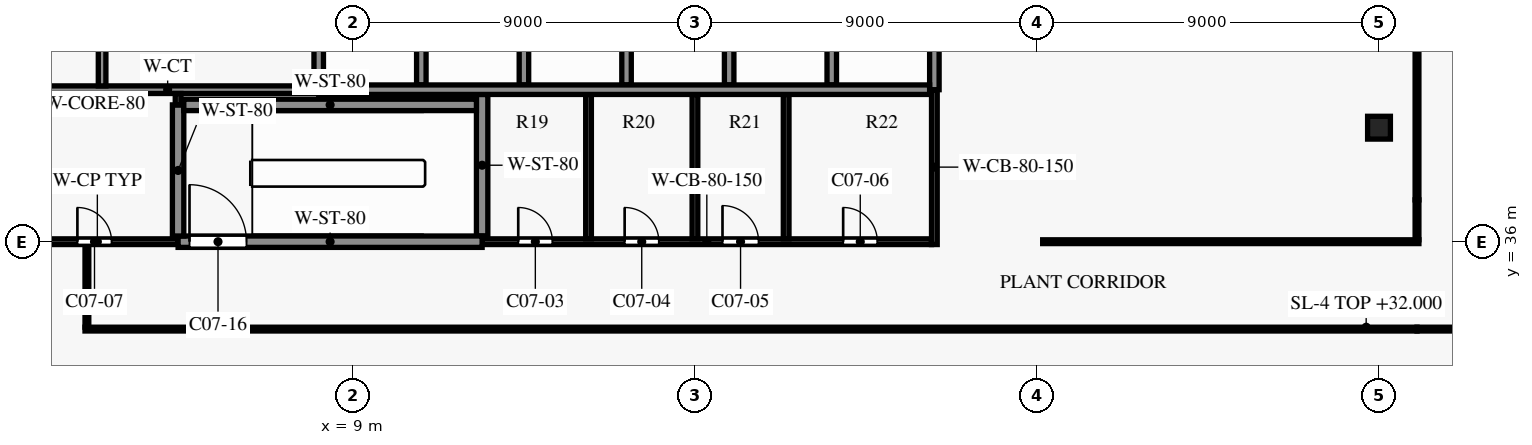
"""IFC4 building model, lengths in metres.
Left out: names, types, materials, properties, quantities, classifications, styles, units other than length and angle.
Written with IfcOpenShell. Run it as: python <this file> out.ifc"""

import sys

from ifc_helpers import new_model, si_unit, direction, frame, frame_2d, origin, origin_2d, place, context, subcontext, project, spatial, rectangle, hollow_rectangle, extrude, element, fill, save


model = new_model("IFC4")
c1 = context("Model", 3, precision=1e-05, world=origin(), true_north=direction((0.0, 1.0)))
c2 = subcontext(c1, "Body", "Model", "MODEL_VIEW")
j1 = project(units=[si_unit("LENGTHUNIT", "METRE"), si_unit("PLANEANGLEUNIT", "RADIAN")], contexts=[c1])
p1 = place(None, origin())
s1 = spatial("IfcSite", under=j1, at=p1, CompositionType="ELEMENT")
p2 = place(p1, origin())
s2 = spatial("IfcBuilding", under=s1, at=p2, CompositionType="ELEMENT")
p3 = place(p2, frame((0.0, 0.0, 32.0)))
s3 = spatial("IfcBuildingStorey", under=s2, at=p3, CompositionType="ELEMENT", Elevation=32.0)
p4 = place(p3, frame((36.0, 39.0, 0.0), z_axis=(0.0, 0.0, 1.0), x_axis=(1.0, 0.0, 0.0)))
e1 = element("IfcColumn", 1, at=p4, inside=s3, PredefinedType="COLUMN", context=c2, shape_type="SweptSolid", body=[
    extrude(hollow_rectangle(XDim=0.6, YDim=0.6, WallThickness=0.03, InnerFilletRadius=0.03, OuterFilletRadius=0.06, at=origin_2d()), origin(), (0.0, 0.0, 1.0), 5.5),
])
p5 = place(p3, frame((0.15, 36.0, 0.0), z_axis=(0.0, 0.0, 1.0), x_axis=(1.0, 0.0, 0.0)))
e2 = element("IfcWall", 2, at=p5, inside=s3, PredefinedType="PARTITIONING", context=c2, shape_type="SweptSolid", body=[
    extrude(rectangle(XDim=4.25, YDim=0.15, at=frame_2d((2.125, 0.0))), origin(), (0.0, 0.0, 1.0), 5.2),
])
p6 = place(p5, frame((1.6, 0.0, 0.0)))
e3 = element("IfcOpeningElement", 3, at=p6, cuts=e2, PredefinedType="OPENING", context=c2, shape_type="SweptSolid", body=[
    extrude(rectangle(XDim=0.9, YDim=2.1, at=frame_2d((0.45, 1.05))), frame((0.0, 0.085, 0.0), z_axis=(0.0, -1.0, 0.0), x_axis=(1.0, 0.0, 0.0)), (0.0, 0.0, 1.0), 0.17),
])
p7 = place(p3, frame((12.4, 36.0, 0.0), z_axis=(0.0, 0.0, 1.0), x_axis=(1.0, 0.0, 0.0)))
e4 = element("IfcWall", 4, at=p7, inside=s3, PredefinedType="SHEAR", context=c2, shape_type="SweptSolid", body=[
    extrude(rectangle(XDim=11.825, YDim=0.15, at=frame_2d((5.913, 0.0))), origin(), (0.0, 0.0, 1.0), 5.2),
])
p8 = place(p7, frame((0.95, 0.0, 0.0)))
e5 = element("IfcOpeningElement", 5, at=p8, cuts=e4, PredefinedType="OPENING", context=c2, shape_type="SweptSolid", body=[
    extrude(rectangle(XDim=0.9, YDim=2.1, at=frame_2d((0.45, 1.05))), frame((0.0, 0.085, 0.0), z_axis=(0.0, -1.0, 0.0), x_axis=(1.0, 0.0, 0.0)), (0.0, 0.0, 1.0), 0.17),
])
p9 = place(p7, frame((3.75, 0.0, 0.0)))
e6 = element("IfcOpeningElement", 6, at=p9, cuts=e4, PredefinedType="OPENING", context=c2, shape_type="SweptSolid", body=[
    extrude(rectangle(XDim=0.9, YDim=2.1, at=frame_2d((0.45, 1.05))), frame((0.0, 0.085, 0.0), z_axis=(0.0, -1.0, 0.0), x_axis=(1.0, 0.0, 0.0)), (0.0, 0.0, 1.0), 0.17),
])
p10 = place(p7, frame((6.325, 0.0, 0.0)))
e7 = element("IfcOpeningElement", 7, at=p10, cuts=e4, PredefinedType="OPENING", context=c2, shape_type="SweptSolid", body=[
    extrude(rectangle(XDim=0.95, YDim=2.1, at=frame_2d((0.475, 1.05))), frame((0.0, 0.085, 0.0), z_axis=(0.0, -1.0, 0.0), x_axis=(1.0, 0.0, 0.0)), (0.0, 0.0, 1.0), 0.17),
])
p11 = place(p7, frame((9.5, 0.0, 0.0)))
e8 = element("IfcOpeningElement", 8, at=p11, cuts=e4, PredefinedType="OPENING", context=c2, shape_type="SweptSolid", body=[
    extrude(rectangle(XDim=0.9, YDim=2.1, at=frame_2d((0.45, 1.05))), frame((0.0, 0.085, 0.0), z_axis=(0.0, -1.0, 0.0), x_axis=(1.0, 0.0, 0.0)), (0.0, 0.0, 1.0), 0.17),
])
p12 = place(p3, frame((4.4, 36.0, 0.0), z_axis=(0.0, 0.0, 1.0), x_axis=(1.0, 0.0, 0.0)))
e9 = element("IfcWall", 9, at=p12, inside=s3, PredefinedType="SHEAR", context=c2, shape_type="SweptSolid", body=[
    extrude(rectangle(XDim=8.0, YDim=0.3, at=frame_2d((4.0, 0.0))), origin(), (0.0, 0.0, 1.0), 5.2),
])
p13 = place(p12, frame((0.3, 0.0, 0.0)))
e10 = element("IfcOpeningElement", 10, at=p13, cuts=e9, PredefinedType="OPENING", context=c2, shape_type="SweptSolid", body=[
    extrude(rectangle(XDim=1.5, YDim=2.2, at=frame_2d((0.75, 1.1))), frame((0.0, 0.16, 0.0), z_axis=(0.0, -1.0, 0.0), x_axis=(1.0, 0.0, 0.0)), (0.0, 0.0, 1.0), 0.32),
])
p14 = place(p3, frame((4.55, 39.6, 0.0), z_axis=(0.0, 0.0, 1.0), x_axis=(1.0, 0.0, 0.0)))
e11 = element("IfcWall", 11, at=p14, inside=s3, PredefinedType="SHEAR", context=c2, shape_type="SweptSolid", body=[
    extrude(rectangle(XDim=7.7, YDim=0.3, at=frame_2d((3.85, 0.0))), origin(), (0.0, 0.0, 1.0), 5.2),
])
p15 = place(p3, frame((0.15, 40.0, 0.0), z_axis=(0.0, 0.0, 1.0), x_axis=(1.0, 0.0, 0.0)))
e12 = element("IfcWall", 12, at=p15, inside=s3, PredefinedType="PARTITIONING", context=c2, shape_type="SweptSolid", body=[
    extrude(rectangle(XDim=7.95, YDim=0.2, at=frame_2d((3.975, 0.0))), origin(), (0.0, 0.0, 1.0), 5.2),
])
p16 = place(p3, frame((8.1, 40.0, 0.0), z_axis=(0.0, 0.0, 1.0), x_axis=(1.0, 0.0, 0.0)))
e13 = element("IfcWall", 13, at=p16, inside=s3, PredefinedType="SHEAR", context=c2, shape_type="SweptSolid", body=[
    extrude(rectangle(XDim=16.075, YDim=0.25, at=frame_2d((8.038, 0.0))), origin(), (0.0, 0.0, 1.0), 5.2),
])
p17 = place(p3, frame((2.4, 40.1, 0.0), z_axis=(0.0, 0.0, 1.0), x_axis=(0.0, 1.0, 0.0)))
e14 = element("IfcWall", 14, at=p17, inside=s3, PredefinedType="PARTITIONING", context=c2, shape_type="SweptSolid", body=[
    extrude(rectangle(XDim=3.0, YDim=0.2, at=frame_2d((1.5, 0.0))), origin(), (0.0, 0.0, 1.0), 5.2),
])
p18 = place(p3, frame((4.4, 39.6, 0.0), z_axis=(0.0, 0.0, 1.0), x_axis=(0.0, 1.0, 0.0)))
e15 = element("IfcWall", 15, at=p18, inside=s3, PredefinedType="PARTITIONING", context=c2, shape_type="SweptSolid", body=[
    extrude(rectangle(XDim=0.3, YDim=0.15, at=frame_2d((0.15, 0.0))), origin(), (0.0, 0.0, 1.0), 5.2),
])
p19 = place(p3, frame((4.4, 36.15, 0.0), z_axis=(0.0, 0.0, 1.0), x_axis=(0.0, 1.0, 0.0)))
e16 = element("IfcWall", 16, at=p19, inside=s3, PredefinedType="SHEAR", context=c2, shape_type="SweptSolid", body=[
    extrude(rectangle(XDim=3.45, YDim=0.3, at=frame_2d((1.725, 0.0))), origin(), (0.0, 0.0, 1.0), 5.2),
])
for number, where, z_axis, x_axis in (
    (17, (8.1, 40.125, 0.0), (0.0, 0.0, 1.0), (0.0, 1.0, 0.0)),
    (18, (10.8, 40.125, 0.0), (0.0, 0.0, 1.0), (0.0, 1.0, 0.0)),
):
    element("IfcWall", number, at=place(p3, frame(where, z_axis=z_axis, x_axis=x_axis)), inside=s3, PredefinedType="SHEAR", context=c2, shape_type="SweptSolid", body=[
        extrude(rectangle(XDim=2.95, YDim=0.25, at=frame_2d((1.475, 0.0))), origin(), (0.0, 0.0, 1.0), 5.2),
    ])
p20 = place(p3, frame((12.4, 36.15, 0.0), z_axis=(0.0, 0.0, 1.0), x_axis=(0.0, 1.0, 0.0)))
e19 = element("IfcWall", 19, at=p20, inside=s3, PredefinedType="SHEAR", context=c2, shape_type="SweptSolid", body=[
    extrude(rectangle(XDim=3.725, YDim=0.3, at=frame_2d((1.863, 0.0))), origin(), (0.0, 0.0, 1.0), 5.2),
])
p21 = place(p3, frame((13.5, 40.125, 0.0), z_axis=(0.0, 0.0, 1.0), x_axis=(0.0, 1.0, 0.0)))
e20 = element("IfcWall", 20, at=p21, inside=s3, PredefinedType="SHEAR", context=c2, shape_type="SweptSolid", body=[
    extrude(rectangle(XDim=2.95, YDim=0.25, at=frame_2d((1.475, 0.0))), origin(), (0.0, 0.0, 1.0), 5.2),
])
p22 = place(p3, frame((15.2, 36.075, 0.0), z_axis=(0.0, 0.0, 1.0), x_axis=(0.0, 1.0, 0.0)))
e21 = element("IfcWall", 21, at=p22, inside=s3, PredefinedType="PARTITIONING", context=c2, shape_type="SweptSolid", body=[
    extrude(rectangle(XDim=3.8, YDim=0.15, at=frame_2d((1.9, 0.0))), origin(), (0.0, 0.0, 1.0), 5.2),
])
p23 = place(p3, frame((16.2, 40.125, 0.0), z_axis=(0.0, 0.0, 1.0), x_axis=(0.0, 1.0, 0.0)))
e22 = element("IfcWall", 22, at=p23, inside=s3, PredefinedType="SHEAR", context=c2, shape_type="SweptSolid", body=[
    extrude(rectangle(XDim=2.95, YDim=0.25, at=frame_2d((1.475, 0.0))), origin(), (0.0, 0.0, 1.0), 5.2),
])
p24 = place(p3, frame((18.0, 36.075, 0.0), z_axis=(0.0, 0.0, 1.0), x_axis=(0.0, 1.0, 0.0)))
e23 = element("IfcWall", 23, at=p24, inside=s3, PredefinedType="PARTITIONING", context=c2, shape_type="SweptSolid", body=[
    extrude(rectangle(XDim=3.8, YDim=0.15, at=frame_2d((1.9, 0.0))), origin(), (0.0, 0.0, 1.0), 5.2),
])
p25 = place(p3, frame((18.9, 40.125, 0.0), z_axis=(0.0, 0.0, 1.0), x_axis=(0.0, 1.0, 0.0)))
e24 = element("IfcWall", 24, at=p25, inside=s3, PredefinedType="SHEAR", context=c2, shape_type="SweptSolid", body=[
    extrude(rectangle(XDim=2.95, YDim=0.25, at=frame_2d((1.475, 0.0))), origin(), (0.0, 0.0, 1.0), 5.2),
])
p26 = place(p3, frame((20.4, 36.075, 0.0), z_axis=(0.0, 0.0, 1.0), x_axis=(0.0, 1.0, 0.0)))
e25 = element("IfcWall", 25, at=p26, inside=s3, PredefinedType="PARTITIONING", context=c2, shape_type="SweptSolid", body=[
    extrude(rectangle(XDim=3.8, YDim=0.15, at=frame_2d((1.9, 0.0))), origin(), (0.0, 0.0, 1.0), 5.2),
])
p27 = place(p3, frame((21.6, 40.125, 0.0), z_axis=(0.0, 0.0, 1.0), x_axis=(0.0, 1.0, 0.0)))
e26 = element("IfcWall", 26, at=p27, inside=s3, PredefinedType="SHEAR", context=c2, shape_type="SweptSolid", body=[
    extrude(rectangle(XDim=2.95, YDim=0.25, at=frame_2d((1.475, 0.0))), origin(), (0.0, 0.0, 1.0), 5.2),
])
p28 = place(p3, frame((24.3, 35.925, 0.0), z_axis=(0.0, 0.0, 1.0), x_axis=(0.0, 1.0, 0.0)))
e27 = element("IfcWall", 27, at=p28, inside=s3, PredefinedType="SHEAR", context=c2, shape_type="SweptSolid", body=[
    extrude(rectangle(XDim=4.075, YDim=0.15, at=frame_2d((2.038, 0.0))), origin(), (0.0, 0.0, 1.0), 5.2),
])
p29 = place(p3, frame((24.3, 40.0, 0.0), z_axis=(0.0, 0.0, 1.0), x_axis=(0.0, 1.0, 0.0)))
e28 = element("IfcWall", 28, at=p29, inside=s3, PredefinedType="SHEAR", context=c2, shape_type="SweptSolid", body=[
    extrude(rectangle(XDim=3.325, YDim=0.25, at=frame_2d((1.663, 0.0))), origin(), (0.0, 0.0, 1.0), 5.2),
])
p30 = place(p3, frame((37.0, 33.7, 0.0), z_axis=(0.0, 0.0, 1.0), x_axis=(-1.0, 0.0, 0.0)))
e29 = element("IfcWall", 29, at=p30, inside=s3, PredefinedType="PARTITIONING", context=c2, shape_type="SweptSolid", body=[
    extrude(rectangle(XDim=35.05, YDim=0.1, at=frame_2d((17.525, 0.0))), origin(), (0.0, 0.0, 1.0), 5.18),
])
p31 = place(p3, frame((70.98, 33.7, 0.0), z_axis=(0.0, 0.0, 1.0), x_axis=(-1.0, 0.0, 0.0)))
e30 = element("IfcWall", 30, at=p31, inside=s3, PredefinedType="PARTITIONING", context=c2, shape_type="SweptSolid", body=[
    extrude(rectangle(XDim=33.98, YDim=0.1, at=frame_2d((16.99, 0.0))), origin(), (0.0, 0.0, 1.0), 5.18),
])
p32 = place(p3, frame((2.0, 33.75, 0.0), z_axis=(0.0, 0.0, 1.0), x_axis=(0.0, 1.0, 0.0)))
e31 = element("IfcWall", 31, at=p32, inside=s3, PredefinedType="PARTITIONING", context=c2, shape_type="SweptSolid", body=[
    extrude(rectangle(XDim=2.1, YDim=0.1, at=frame_2d((1.05, 0.0))), origin(), (0.0, 0.0, 1.0), 5.18),
])
p33 = place(p3, frame((27.15, 36.0, 0.0), z_axis=(0.0, 0.0, 1.0), x_axis=(1.0, 0.0, 0.0)))
e32 = element("IfcWall", 32, at=p33, inside=s3, PredefinedType="PARTITIONING", context=c2, shape_type="SweptSolid", body=[
    extrude(rectangle(XDim=9.9, YDim=0.1, at=frame_2d((4.95, 0.0))), origin(), (0.0, 0.0, 1.0), 5.18),
])
p34 = place(p3, frame((37.0, 36.05, 0.0), z_axis=(0.0, 0.0, 1.0), x_axis=(0.0, 1.0, 0.0)))
e33 = element("IfcWall", 33, at=p34, inside=s3, PredefinedType="PARTITIONING", context=c2, shape_type="SweptSolid", body=[
    extrude(rectangle(XDim=1.05, YDim=0.1, at=frame_2d((0.525, 0.0))), origin(), (0.0, 0.0, 1.0), 5.18),
])
p35 = place(p3, frame((37.0, 37.1, 0.0), z_axis=(0.0, 0.0, 1.0), x_axis=(0.0, 1.0, 0.0)))
e34 = element("IfcWall", 34, at=p35, inside=s3, PredefinedType="PARTITIONING", context=c2, shape_type="SweptSolid", body=[
    extrude(rectangle(XDim=13.85, YDim=0.1, at=frame_2d((6.925, 0.0))), origin(), (0.0, 0.0, 1.0), 4.48),
])
p36 = place(p8, origin())
e35 = element("IfcDoor", 35, at=p36, inside=s3, OperationType="SINGLE_SWING_RIGHT", PredefinedType="DOOR", context=c2, shape_type="SweptSolid", body=[
    extrude(rectangle(XDim=0.9, YDim=2.1, at=frame_2d((0.45, 1.05))), frame((0.0, 0.025, 0.0), z_axis=(0.0, -1.0, 0.0), x_axis=(1.0, 0.0, 0.0)), (0.0, 0.0, 1.0), 0.05),
])
fill(e5, e35)
p37 = place(p9, origin())
e36 = element("IfcDoor", 36, at=p37, inside=s3, OperationType="SINGLE_SWING_LEFT", PredefinedType="DOOR", context=c2, shape_type="SweptSolid", body=[
    extrude(rectangle(XDim=0.9, YDim=2.1, at=frame_2d((0.45, 1.05))), frame((0.0, 0.025, 0.0), z_axis=(0.0, -1.0, 0.0), x_axis=(1.0, 0.0, 0.0)), (0.0, 0.0, 1.0), 0.05),
])
fill(e6, e36)
p38 = place(p10, origin())
e37 = element("IfcDoor", 37, at=p38, inside=s3, OperationType="SINGLE_SWING_RIGHT", PredefinedType="DOOR", context=c2, shape_type="SweptSolid", body=[
    extrude(rectangle(XDim=0.95, YDim=2.1, at=frame_2d((0.475, 1.05))), frame((0.0, 0.025, 0.0), z_axis=(0.0, -1.0, 0.0), x_axis=(1.0, 0.0, 0.0)), (0.0, 0.0, 1.0), 0.05),
])
fill(e7, e37)
p39 = place(p11, origin())
e38 = element("IfcDoor", 38, at=p39, inside=s3, OperationType="SINGLE_SWING_LEFT", PredefinedType="DOOR", context=c2, shape_type="SweptSolid", body=[
    extrude(rectangle(XDim=0.9, YDim=2.1, at=frame_2d((0.45, 1.05))), frame((0.0, 0.025, 0.0), z_axis=(0.0, -1.0, 0.0), x_axis=(1.0, 0.0, 0.0)), (0.0, 0.0, 1.0), 0.05),
])
fill(e8, e38)
p40 = place(p6, origin())
e39 = element("IfcDoor", 39, at=p40, inside=s3, OperationType="SINGLE_SWING_LEFT", PredefinedType="DOOR", context=c2, shape_type="SweptSolid", body=[
    extrude(rectangle(XDim=0.9, YDim=2.1, at=frame_2d((0.45, 1.05))), frame((0.0, 0.025, 0.0), z_axis=(0.0, -1.0, 0.0), x_axis=(1.0, 0.0, 0.0)), (0.0, 0.0, 1.0), 0.05),
])
fill(e3, e39)
p41 = place(p13, origin())
e40 = element("IfcDoor", 40, at=p41, inside=s3, OperationType="SINGLE_SWING_RIGHT", PredefinedType="DOOR", context=c2, shape_type="SweptSolid", body=[
    extrude(rectangle(XDim=1.5, YDim=2.2, at=frame_2d((0.75, 1.1))), frame((0.0, 0.025, 0.0), z_axis=(0.0, -1.0, 0.0), x_axis=(1.0, 0.0, 0.0)), (0.0, 0.0, 1.0), 0.05),
])
fill(e10, e40)
save(model, sys.argv[1])
